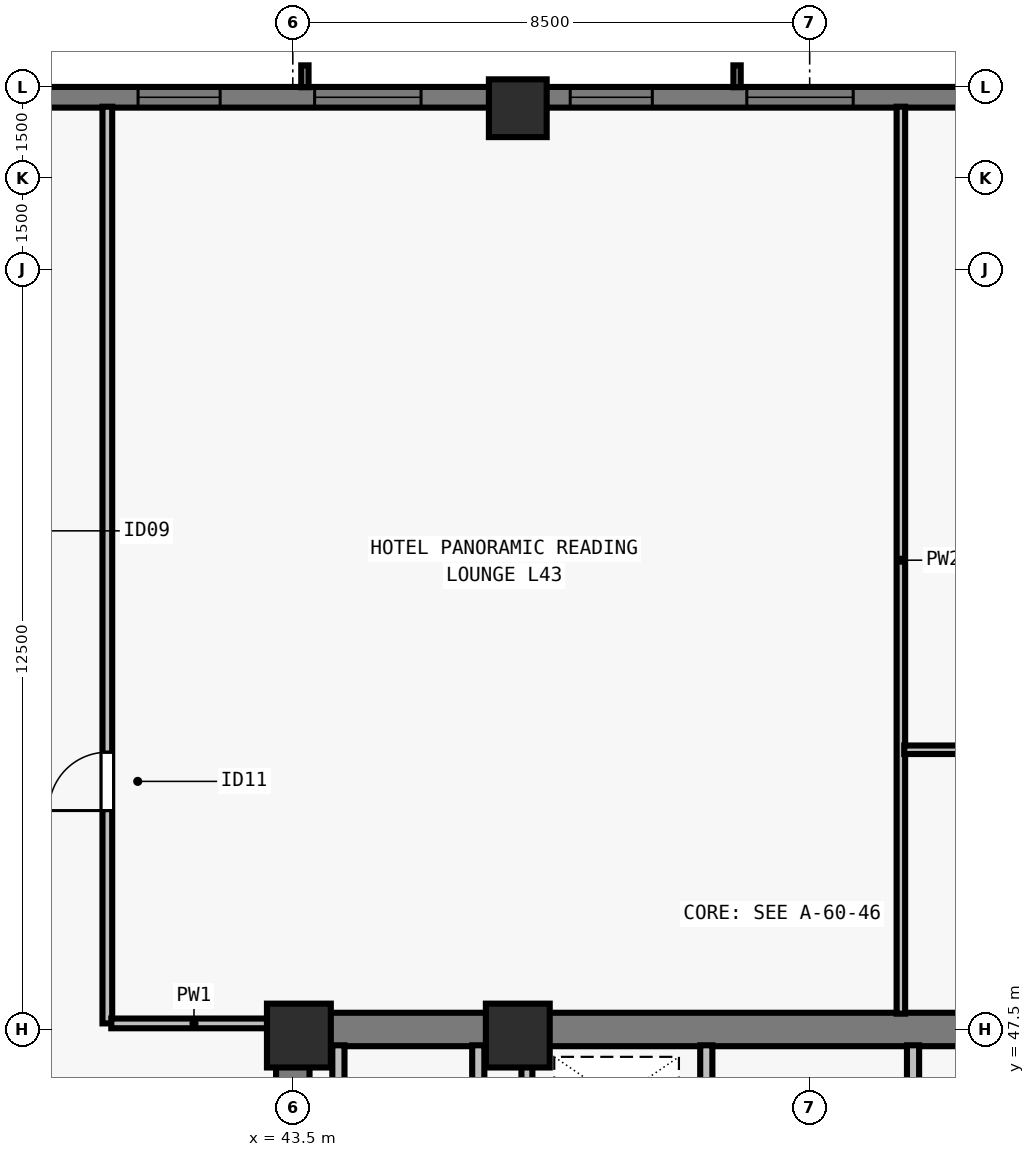
"""IFC4 building model, lengths in metres.
Left out: names, types, materials, properties, quantities, classifications, styles, units other than length and angle.
Written with IfcOpenShell. Run it as: python <this file> out.ifc"""

import sys

from ifc_helpers import new_model, si_unit, direction, frame, frame_2d, origin, origin_2d, place, context, subcontext, project, spatial, rectangle, extrude, element, fill, save


model = new_model("IFC4")
c1 = context("Model", 3, precision=1e-05, world=origin(), true_north=direction((0.0, 1.0)))
c2 = subcontext(c1, "Body", "Model", "MODEL_VIEW")
j1 = project(units=[si_unit("LENGTHUNIT", "METRE"), si_unit("PLANEANGLEUNIT", "RADIAN")], contexts=[c1])
p1 = place(None, origin())
s1 = spatial("IfcSite", under=j1, at=p1, CompositionType="ELEMENT")
p2 = place(p1, origin())
s2 = spatial("IfcBuilding", under=s1, at=p2, CompositionType="ELEMENT")
p3 = place(p2, frame((0.0, 0.0, 158.5)))
s3 = spatial("IfcBuildingStorey", under=s2, at=p3, CompositionType="ELEMENT", Elevation=158.5)
for number, where, z_axis, x_axis in (
    (1, (43.6, 47.4, 0.0), (0.0, 0.0, 1.0), (1.0, 0.0, 0.0)),
    (2, (47.2, 47.4, 0.0), (0.0, 0.0, 1.0), (1.0, 0.0, 0.0)),
):
    element("IfcColumn", number, at=place(p3, frame(where, z_axis=z_axis, x_axis=x_axis)), inside=s3, PredefinedType="COLUMN", context=c2, shape_type="SweptSolid", body=[
        extrude(rectangle(XDim=1.05, YDim=1.05, at=origin_2d()), origin(), (0.0, 0.0, 1.0), 3.5),
    ])
p4 = place(p3, frame((47.2, 62.65, 0.0), z_axis=(0.0, 0.0, 1.0), x_axis=(1.0, 0.0, 0.0)))
e3 = element("IfcColumn", 3, at=p4, inside=s3, PredefinedType="COLUMN", context=c2, shape_type="SweptSolid", body=[
    extrude(rectangle(XDim=0.95, YDim=0.95, at=origin_2d()), origin(), (0.0, 0.0, 1.0), 3.5),
])
p5 = place(p3, frame((32.0, 62.83, 0.0), z_axis=(0.0, 0.0, 1.0), x_axis=(1.0, 0.0, 0.0)))
e4 = element("IfcWall", 4, at=p5, inside=s3, PredefinedType="SOLIDWALL", context=c2, shape_type="SweptSolid", body=[
    extrude(rectangle(XDim=39.682, YDim=0.34, at=frame_2d((19.841, 0.0))), origin(), (0.0, 0.0, 1.0), 3.28),
])
p6 = place(p5, frame((3.902, 0.0, 0.8)))
e5 = element("IfcOpeningElement", 5, at=p6, cuts=e4, PredefinedType="OPENING", context=c2, shape_type="SweptSolid", body=[
    extrude(rectangle(XDim=1.75, YDim=1.66, at=frame_2d((0.875, 0.83))), frame((0.0, 0.18, 0.0), z_axis=(0.0, -1.0, 0.0), x_axis=(1.0, 0.0, 0.0)), (0.0, 0.0, 1.0), 0.36),
])
p7 = place(p5, frame((8.955, 0.0, 0.8)))
e6 = element("IfcOpeningElement", 6, at=p7, cuts=e4, PredefinedType="OPENING", context=c2, shape_type="SweptSolid", body=[
    extrude(rectangle(XDim=1.35, YDim=1.66, at=frame_2d((0.675, 0.83))), frame((0.0, 0.18, 0.0), z_axis=(0.0, -1.0, 0.0), x_axis=(1.0, 0.0, 0.0)), (0.0, 0.0, 1.0), 0.36),
])
p8 = place(p5, frame((11.859, 0.0, 0.8)))
e7 = element("IfcOpeningElement", 7, at=p8, cuts=e4, PredefinedType="OPENING", context=c2, shape_type="SweptSolid", body=[
    extrude(rectangle(XDim=1.75, YDim=1.66, at=frame_2d((0.875, 0.83))), frame((0.0, 0.18, 0.0), z_axis=(0.0, -1.0, 0.0), x_axis=(1.0, 0.0, 0.0)), (0.0, 0.0, 1.0), 0.36),
])
p9 = place(p5, frame((16.062, 0.0, 0.8)))
e8 = element("IfcOpeningElement", 8, at=p9, cuts=e4, PredefinedType="OPENING", context=c2, shape_type="SweptSolid", body=[
    extrude(rectangle(XDim=1.35, YDim=1.66, at=frame_2d((0.675, 0.83))), frame((0.0, 0.18, 0.0), z_axis=(0.0, -1.0, 0.0), x_axis=(1.0, 0.0, 0.0)), (0.0, 0.0, 1.0), 0.36),
])
p10 = place(p5, frame((18.966, 0.0, 0.8)))
e9 = element("IfcOpeningElement", 9, at=p10, cuts=e4, PredefinedType="OPENING", context=c2, shape_type="SweptSolid", body=[
    extrude(rectangle(XDim=1.75, YDim=1.66, at=frame_2d((0.875, 0.83))), frame((0.0, 0.18, 0.0), z_axis=(0.0, -1.0, 0.0), x_axis=(1.0, 0.0, 0.0)), (0.0, 0.0, 1.0), 0.36),
])
p11 = place(p5, frame((22.719, 0.0, 0.8)))
e10 = element("IfcOpeningElement", 10, at=p11, cuts=e4, PredefinedType="OPENING", context=c2, shape_type="SweptSolid", body=[
    extrude(rectangle(XDim=1.35, YDim=1.66, at=frame_2d((0.675, 0.83))), frame((0.0, 0.18, 0.0), z_axis=(0.0, -1.0, 0.0), x_axis=(1.0, 0.0, 0.0)), (0.0, 0.0, 1.0), 0.36),
])
p12 = place(p5, frame((26.073, 0.0, 0.8)))
e11 = element("IfcOpeningElement", 11, at=p12, cuts=e4, PredefinedType="OPENING", context=c2, shape_type="SweptSolid", body=[
    extrude(rectangle(XDim=1.75, YDim=1.66, at=frame_2d((0.875, 0.83))), frame((0.0, 0.18, 0.0), z_axis=(0.0, -1.0, 0.0), x_axis=(1.0, 0.0, 0.0)), (0.0, 0.0, 1.0), 0.36),
])
p13 = place(p5, frame((28.977, 0.0, 0.8)))
e12 = element("IfcOpeningElement", 12, at=p13, cuts=e4, PredefinedType="OPENING", context=c2, shape_type="SweptSolid", body=[
    extrude(rectangle(XDim=1.35, YDim=1.66, at=frame_2d((0.675, 0.83))), frame((0.0, 0.18, 0.0), z_axis=(0.0, -1.0, 0.0), x_axis=(1.0, 0.0, 0.0)), (0.0, 0.0, 1.0), 0.36),
])
p14 = place(p5, frame((33.18, 0.0, 0.8)))
e13 = element("IfcOpeningElement", 13, at=p14, cuts=e4, PredefinedType="OPENING", context=c2, shape_type="SweptSolid", body=[
    extrude(rectangle(XDim=1.75, YDim=1.66, at=frame_2d((0.875, 0.83))), frame((0.0, 0.18, 0.0), z_axis=(0.0, -1.0, 0.0), x_axis=(1.0, 0.0, 0.0)), (0.0, 0.0, 1.0), 0.36),
])
p15 = place(p3, frame((43.225, 47.5, 0.0), z_axis=(0.0, 0.0, 1.0), x_axis=(1.0, 0.0, 0.0)))
e14 = element("IfcWall", 14, at=p15, inside=s3, PredefinedType="SHEAR", context=c2, shape_type="SweptSolid", body=[
    extrude(rectangle(XDim=17.55, YDim=0.55, at=frame_2d((8.775, 0.0))), origin(), (0.0, 0.0, 1.0), 3.28),
])
p16 = place(p3, frame((43.5, 40.8, 0.0), z_axis=(0.0, 0.0, 1.0), x_axis=(0.0, 1.0, 0.0)))
e15 = element("IfcWall", 15, at=p16, inside=s3, PredefinedType="SHEAR", context=c2, shape_type="SweptSolid", body=[
    extrude(rectangle(XDim=6.435, YDim=0.55, at=frame_2d((3.218, 0.0))), origin(), (0.0, 0.0, 1.0), 3.28),
])
p17 = place(p3, frame((50.3, 40.585, 0.0), z_axis=(0.0, 0.0, 1.0), x_axis=(0.0, 1.0, 0.0)))
e16 = element("IfcWall", 16, at=p17, inside=s3, PredefinedType="SOLIDWALL", context=c2, shape_type="SweptSolid", body=[
    extrude(rectangle(XDim=6.655, YDim=0.2, at=frame_2d((3.328, 0.0))), origin(), (0.0, 0.0, 1.0), 3.28),
])
p18 = place(p17, frame((5.065, 0.0, 0.0)))
e17 = element("IfcOpeningElement", 17, at=p18, cuts=e16, PredefinedType="OPENING", context=c2, shape_type="SweptSolid", body=[
    extrude(rectangle(XDim=0.8, YDim=2.08, at=frame_2d((0.4, 1.04))), frame((0.0, 0.11, 0.0), z_axis=(0.0, -1.0, 0.0), x_axis=(1.0, 0.0, 0.0)), (0.0, 0.0, 1.0), 0.22),
])
p19 = place(p3, frame((53.7, 40.585, 0.0), z_axis=(0.0, 0.0, 1.0), x_axis=(0.0, 1.0, 0.0)))
e18 = element("IfcWall", 18, at=p19, inside=s3, PredefinedType="SOLIDWALL", context=c2, shape_type="SweptSolid", body=[
    extrude(rectangle(XDim=6.655, YDim=0.2, at=frame_2d((3.328, 0.0))), origin(), (0.0, 0.0, 1.0), 3.28),
])
p20 = place(p19, frame((0.195, 0.0, 0.0)))
e19 = element("IfcOpeningElement", 19, at=p20, cuts=e18, PredefinedType="OPENING", context=c2, shape_type="SweptSolid", body=[
    extrude(rectangle(XDim=0.8, YDim=2.08, at=frame_2d((0.4, 1.04))), frame((0.0, 0.11, 0.0), z_axis=(0.0, -1.0, 0.0), x_axis=(1.0, 0.0, 0.0)), (0.0, 0.0, 1.0), 0.22),
])
p21 = place(p19, frame((4.265, 0.0, 0.0)))
e20 = element("IfcOpeningElement", 20, at=p21, cuts=e18, PredefinedType="OPENING", context=c2, shape_type="SweptSolid", body=[
    extrude(rectangle(XDim=0.95, YDim=2.12, at=frame_2d((0.475, 1.06))), frame((0.0, 0.11, 0.0), z_axis=(0.0, -1.0, 0.0), x_axis=(1.0, 0.0, 0.0)), (0.0, 0.0, 1.0), 0.22),
])
for number, where, z_axis, x_axis in (
    (21, (46.55, 43.735, 0.0), (0.0, 0.0, 1.0), (0.0, 1.0, 0.0)),
    (22, (44.25, 43.735, 0.0), (0.0, 0.0, 1.0), (0.0, 1.0, 0.0)),
):
    element("IfcWall", number, at=place(p3, frame(where, z_axis=z_axis, x_axis=x_axis)), inside=s3, PredefinedType="SOLIDWALL", context=c2, shape_type="SweptSolid", body=[
        extrude(rectangle(XDim=3.505, YDim=0.2, at=frame_2d((1.752, 0.0))), origin(), (0.0, 0.0, 1.0), 3.28),
    ])
p22 = place(p3, frame((47.35, 43.735, 0.0), z_axis=(0.0, 0.0, 1.0), x_axis=(0.0, 1.0, 0.0)))
e23 = element("IfcWall", 23, at=p22, inside=s3, PredefinedType="SOLIDWALL", context=c2, shape_type="SweptSolid", body=[
    extrude(rectangle(XDim=3.505, YDim=0.18, at=frame_2d((1.752, 0.0))), origin(), (0.0, 0.0, 1.0), 3.28),
])
p23 = place(p3, frame((40.45, 47.6, 0.0), z_axis=(0.0, 0.0, 1.0), x_axis=(0.0, 1.0, 0.0)))
e24 = element("IfcWall", 24, at=p23, inside=s3, PredefinedType="PARTITIONING", context=c2, shape_type="SweptSolid", body=[
    extrude(rectangle(XDim=15.075, YDim=0.16, at=frame_2d((7.538, 0.0))), origin(), (0.0, 0.0, 1.0), 2.555),
])
p24 = place(p23, frame((3.5, 0.0, 0.0)))
e25 = element("IfcOpeningElement", 25, at=p24, cuts=e24, PredefinedType="OPENING", context=c2, shape_type="SweptSolid", body=[
    extrude(rectangle(XDim=0.96, YDim=2.12, at=frame_2d((0.48, 1.06))), frame((0.0, 0.09, 0.0), z_axis=(0.0, -1.0, 0.0), x_axis=(1.0, 0.0, 0.0)), (0.0, 0.0, 1.0), 0.18),
])
p25 = place(p3, frame((40.515, 47.6, 0.0), z_axis=(0.0, 0.0, 1.0), x_axis=(1.0, 0.0, 0.0)))
e26 = element("IfcWall", 26, at=p25, inside=s3, PredefinedType="PARTITIONING", context=c2, shape_type="SweptSolid", body=[
    extrude(rectangle(XDim=2.72, YDim=0.16, at=frame_2d((1.36, 0.0))), origin(), (0.0, 0.0, 1.0), 3.28),
])
p26 = place(p3, frame((53.5, 47.76, 0.0), z_axis=(0.0, 0.0, 1.0), x_axis=(0.0, 1.0, 0.0)))
e27 = element("IfcWall", 27, at=p26, inside=s3, PredefinedType="PARTITIONING", context=c2, shape_type="SweptSolid", body=[
    extrude(rectangle(XDim=14.915, YDim=0.14, at=frame_2d((7.458, 0.0))), origin(), (0.0, 0.0, 1.0), 2.896),
])
p27 = place(p3, frame((53.555, 52.1, 0.0), z_axis=(0.0, 0.0, 1.0), x_axis=(1.0, 0.0, 0.0)))
e28 = element("IfcWall", 28, at=p27, inside=s3, PredefinedType="PARTITIONING", context=c2, shape_type="SweptSolid", body=[
    extrude(rectangle(XDim=9.03, YDim=0.14, at=frame_2d((4.515, 0.0))), origin(), (0.0, 0.0, 1.0), 3.28),
])
p28 = place(p7, origin())
e29 = element("IfcWindow", 29, at=p28, inside=s3, PartitioningType="SINGLE_PANEL", PredefinedType="WINDOW", context=c2, shape_type="SweptSolid", body=[
    extrude(rectangle(XDim=1.35, YDim=1.66, at=frame_2d((0.675, 0.83))), frame((0.0, -0.05, 0.0), z_axis=(0.0, -1.0, 0.0), x_axis=(1.0, 0.0, 0.0)), (0.0, 0.0, 1.0), 0.06),
])
fill(e6, e29)
p29 = place(p8, origin())
e30 = element("IfcWindow", 30, at=p29, inside=s3, PartitioningType="SINGLE_PANEL", PredefinedType="WINDOW", context=c2, shape_type="SweptSolid", body=[
    extrude(rectangle(XDim=1.75, YDim=1.66, at=frame_2d((0.875, 0.83))), frame((0.0, -0.05, 0.0), z_axis=(0.0, -1.0, 0.0), x_axis=(1.0, 0.0, 0.0)), (0.0, 0.0, 1.0), 0.06),
])
fill(e7, e30)
p30 = place(p9, origin())
e31 = element("IfcWindow", 31, at=p30, inside=s3, PartitioningType="SINGLE_PANEL", PredefinedType="WINDOW", context=c2, shape_type="SweptSolid", body=[
    extrude(rectangle(XDim=1.35, YDim=1.66, at=frame_2d((0.675, 0.83))), frame((0.0, -0.05, 0.0), z_axis=(0.0, -1.0, 0.0), x_axis=(1.0, 0.0, 0.0)), (0.0, 0.0, 1.0), 0.06),
])
fill(e8, e31)
p31 = place(p10, origin())
e32 = element("IfcWindow", 32, at=p31, inside=s3, PartitioningType="SINGLE_PANEL", PredefinedType="WINDOW", context=c2, shape_type="SweptSolid", body=[
    extrude(rectangle(XDim=1.75, YDim=1.66, at=frame_2d((0.875, 0.83))), frame((0.0, -0.05, 0.0), z_axis=(0.0, -1.0, 0.0), x_axis=(1.0, 0.0, 0.0)), (0.0, 0.0, 1.0), 0.06),
])
fill(e9, e32)
p32 = place(p24, origin())
e33 = element("IfcDoor", 33, at=p32, inside=s3, OperationType="SINGLE_SWING_LEFT", PredefinedType="DOOR", context=c2, shape_type="SweptSolid", body=[
    extrude(rectangle(XDim=0.96, YDim=2.12, at=frame_2d((0.48, 1.06))), frame((0.0, 0.025, 0.0), z_axis=(0.0, -1.0, 0.0), x_axis=(1.0, 0.0, 0.0)), (0.0, 0.0, 1.0), 0.05),
])
fill(e25, e33)
save(model, sys.argv[1])
